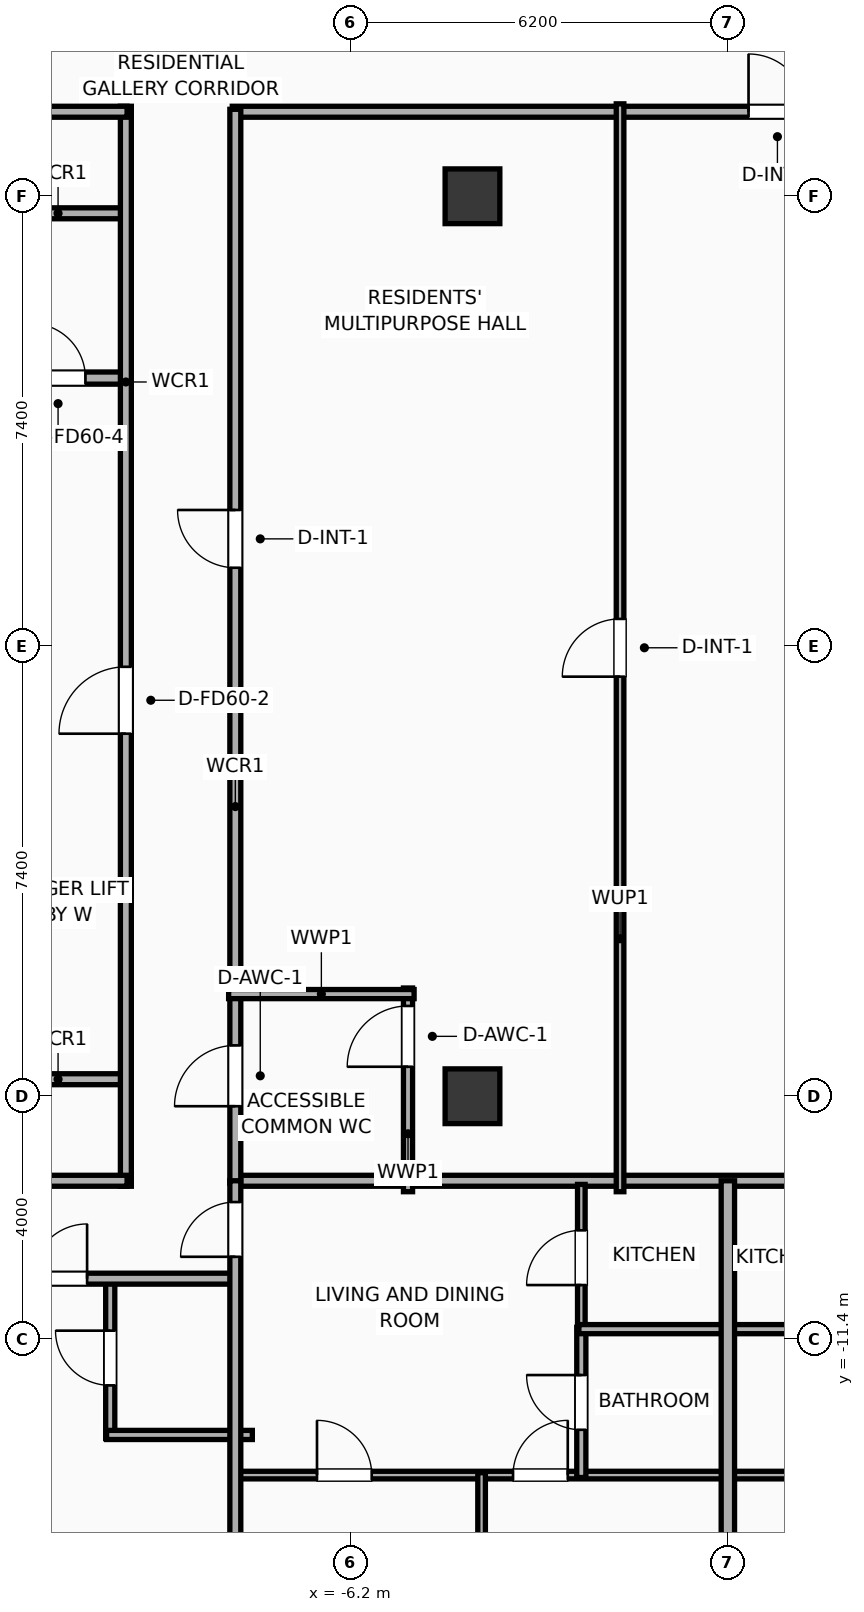
"""IFC4 building model, lengths in metres.
Left out: names, types, materials, properties, quantities, classifications, styles, units other than length and angle.
Written with IfcOpenShell. Run it as: python <this file> out.ifc"""

import sys

from ifc_helpers import new_model, si_unit, direction, frame, frame_2d, origin, origin_2d, place, context, subcontext, project, spatial, rectangle, extrude, element, fill, save


model = new_model("IFC4")
c1 = context("Model", 3, precision=1e-05, world=origin(), true_north=direction((0.0, 1.0)))
c2 = subcontext(c1, "Body", "Model", "MODEL_VIEW")
j1 = project(units=[si_unit("LENGTHUNIT", "METRE"), si_unit("PLANEANGLEUNIT", "RADIAN")], contexts=[c1])
p1 = place(None, origin())
s1 = spatial("IfcSite", under=j1, at=p1, CompositionType="ELEMENT")
p2 = place(p1, origin())
s2 = spatial("IfcBuilding", under=s1, at=p2, CompositionType="ELEMENT")
p3 = place(p2, frame((0.0, 0.0, 208.0)))
s3 = spatial("IfcBuildingStorey", under=s2, at=p3, CompositionType="ELEMENT", Elevation=208.0)
for number, where, z_axis, x_axis in (
    (1, (-4.2, -7.4, 0.0), (0.0, 0.0, 1.0), (1.0, 0.0, 0.0)),
    (2, (-4.2, 7.4, 0.0), (0.0, 0.0, 1.0), (1.0, 0.0, 0.0)),
):
    element("IfcColumn", number, at=place(p3, frame(where, z_axis=z_axis, x_axis=x_axis)), inside=s3, PredefinedType="COLUMN", context=c2, shape_type="SweptSolid", body=[
        extrude(rectangle(XDim=0.9, YDim=0.9, at=origin_2d()), origin(), (0.0, 0.0, 1.0), 3.9),
    ])
p4 = place(p3, frame((-12.15, 4.41, 0.0), z_axis=(0.0, 0.0, 1.0), x_axis=(1.0, 0.0, 0.0)))
e3 = element("IfcWall", 3, at=p4, inside=s3, PredefinedType="PARTITIONING", context=c2, shape_type="SweptSolid", body=[
    extrude(rectangle(XDim=2.27, YDim=0.2, at=frame_2d((1.135, 0.0))), origin(), (0.0, 0.0, 1.0), 3.65),
])
p5 = place(p4, frame((0.685, 0.0, 0.0)))
e4 = element("IfcOpeningElement", 4, at=p5, cuts=e3, PredefinedType="OPENING", context=c2, shape_type="SweptSolid", body=[
    extrude(rectangle(XDim=0.9, YDim=2.05, at=frame_2d((0.45, 1.025))), frame((0.0, 0.11, 0.0), z_axis=(0.0, -1.0, 0.0), x_axis=(1.0, 0.0, 0.0)), (0.0, 0.0, 1.0), 0.22),
])
for number, where, z_axis, x_axis in (
    (5, (-12.15, 7.12, 0.0), (0.0, 0.0, 1.0), (1.0, 0.0, 0.0)),
    (6, (-12.15, -7.12, 0.0), (0.0, 0.0, 1.0), (1.0, 0.0, 0.0)),
):
    element("IfcWall", number, at=place(p3, frame(where, z_axis=z_axis, x_axis=x_axis)), inside=s3, PredefinedType="PARTITIONING", context=c2, shape_type="SweptSolid", body=[
        extrude(rectangle(XDim=2.27, YDim=0.18, at=frame_2d((1.135, 0.0))), origin(), (0.0, 0.0, 1.0), 3.65),
    ])
p6 = place(p3, frame((-9.9, -8.88, 0.0), z_axis=(0.0, 0.0, 1.0), x_axis=(0.0, 1.0, 0.0)))
e7 = element("IfcWall", 7, at=p6, inside=s3, PredefinedType="PARTITIONING", context=c2, shape_type="SweptSolid", body=[
    extrude(rectangle(XDim=17.76, YDim=0.18, at=frame_2d((8.88, 0.0))), origin(), (0.0, 0.0, 1.0), 3.65),
])
p7 = place(p6, frame((7.442, 0.0, 0.0)))
e8 = element("IfcOpeningElement", 8, at=p7, cuts=e7, PredefinedType="OPENING", context=c2, shape_type="SweptSolid", body=[
    extrude(rectangle(XDim=1.1, YDim=2.05, at=frame_2d((0.55, 1.025))), frame((0.0, 0.1, 0.0), z_axis=(0.0, -1.0, 0.0), x_axis=(1.0, 0.0, 0.0)), (0.0, 0.0, 1.0), 0.2),
])
p8 = place(p3, frame((-26.23, 8.79, 0.0), z_axis=(0.0, 0.0, 1.0), x_axis=(1.0, 0.0, 0.0)))
e9 = element("IfcWall", 9, at=p8, inside=s3, PredefinedType="PARTITIONING", context=c2, shape_type="SweptSolid", body=[
    extrude(rectangle(XDim=16.35, YDim=0.18, at=frame_2d((8.175, 0.0))), origin(), (0.0, 0.0, 1.0), 3.65),
])
p9 = place(p8, frame((2.051, 0.0, 0.0)))
e10 = element("IfcOpeningElement", 10, at=p9, cuts=e9, PredefinedType="OPENING", context=c2, shape_type="SweptSolid", body=[
    extrude(rectangle(XDim=1.15, YDim=2.05, at=frame_2d((0.575, 1.025))), frame((0.0, 0.1, 0.0), z_axis=(0.0, -1.0, 0.0), x_axis=(1.0, 0.0, 0.0)), (0.0, 0.0, 1.0), 0.2),
])
p10 = place(p3, frame((-26.23, -8.79, 0.0), z_axis=(0.0, 0.0, 1.0), x_axis=(1.0, 0.0, 0.0)))
e11 = element("IfcWall", 11, at=p10, inside=s3, PredefinedType="PARTITIONING", context=c2, shape_type="SweptSolid", body=[
    extrude(rectangle(XDim=16.35, YDim=0.18, at=frame_2d((8.175, 0.0))), origin(), (0.0, 0.0, 1.0), 3.65),
])
p11 = place(p3, frame((-8.15, 8.79, 0.0), z_axis=(0.0, 0.0, 1.0), x_axis=(1.0, 0.0, 0.0)))
e12 = element("IfcWall", 12, at=p11, inside=s3, PredefinedType="PARTITIONING", context=c2, shape_type="SweptSolid", body=[
    extrude(rectangle(XDim=16.3, YDim=0.18, at=frame_2d((8.15, 0.0))), origin(), (0.0, 0.0, 1.0), 3.65),
])
p12 = place(p11, frame((8.49, 0.0, 0.0)))
e13 = element("IfcOpeningElement", 13, at=p12, cuts=e12, PredefinedType="OPENING", context=c2, shape_type="SweptSolid", body=[
    extrude(rectangle(XDim=0.95, YDim=2.05, at=frame_2d((0.475, 1.025))), frame((0.0, 0.1, 0.0), z_axis=(0.0, -1.0, 0.0), x_axis=(1.0, 0.0, 0.0)), (0.0, 0.0, 1.0), 0.2),
])
p13 = place(p3, frame((-8.15, -8.79, 0.0), z_axis=(0.0, 0.0, 1.0), x_axis=(1.0, 0.0, 0.0)))
e14 = element("IfcWall", 14, at=p13, inside=s3, PredefinedType="PARTITIONING", context=c2, shape_type="SweptSolid", body=[
    extrude(rectangle(XDim=16.3, YDim=0.18, at=frame_2d((8.15, 0.0))), origin(), (0.0, 0.0, 1.0), 3.65),
])
p14 = place(p3, frame((-8.1, -8.83, 0.0), z_axis=(0.0, 0.0, 1.0), x_axis=(0.0, 1.0, 0.0)))
e15 = element("IfcWall", 15, at=p14, inside=s3, PredefinedType="PARTITIONING", context=c2, shape_type="SweptSolid", body=[
    extrude(rectangle(XDim=17.66, YDim=0.18, at=frame_2d((8.83, 0.0))), origin(), (0.0, 0.0, 1.0), 3.65),
])
p15 = place(p14, frame((1.266, 0.0, 0.0)))
e16 = element("IfcOpeningElement", 16, at=p15, cuts=e15, PredefinedType="OPENING", context=c2, shape_type="SweptSolid", body=[
    extrude(rectangle(XDim=1.0, YDim=2.05, at=frame_2d((0.5, 1.025))), frame((0.0, 0.1, 0.0), z_axis=(0.0, -1.0, 0.0), x_axis=(1.0, 0.0, 0.0)), (0.0, 0.0, 1.0), 0.2),
])
p16 = place(p14, frame((10.121, 0.0, 0.0)))
e17 = element("IfcOpeningElement", 17, at=p16, cuts=e15, PredefinedType="OPENING", context=c2, shape_type="SweptSolid", body=[
    extrude(rectangle(XDim=0.95, YDim=2.05, at=frame_2d((0.475, 1.025))), frame((0.0, 0.1, 0.0), z_axis=(0.0, -1.0, 0.0), x_axis=(1.0, 0.0, 0.0)), (0.0, 0.0, 1.0), 0.2),
])
p17 = place(p3, frame((-5.26, -8.97, 0.0), z_axis=(0.0, 0.0, 1.0), x_axis=(0.0, 1.0, 0.0)))
e18 = element("IfcWall", 18, at=p17, inside=s3, PredefinedType="PLUMBINGWALL", context=c2, shape_type="SweptSolid", body=[
    extrude(rectangle(XDim=3.35, YDim=0.15, at=frame_2d((1.675, 0.0))), origin(), (0.0, 0.0, 1.0), 3.65),
])
p18 = place(p17, frame((2.055, 0.0, 0.0)))
e19 = element("IfcOpeningElement", 19, at=p18, cuts=e18, PredefinedType="OPENING", context=c2, shape_type="SweptSolid", body=[
    extrude(rectangle(XDim=1.0, YDim=2.05, at=frame_2d((0.5, 1.025))), frame((0.0, 0.085, 0.0), z_axis=(0.0, -1.0, 0.0), x_axis=(1.0, 0.0, 0.0)), (0.0, 0.0, 1.0), 0.17),
])
p19 = place(p3, frame((-8.21, -5.72, 0.0), z_axis=(0.0, 0.0, 1.0), x_axis=(1.0, 0.0, 0.0)))
e20 = element("IfcWall", 20, at=p19, inside=s3, PredefinedType="PLUMBINGWALL", context=c2, shape_type="SweptSolid", body=[
    extrude(rectangle(XDim=3.05, YDim=0.15, at=frame_2d((1.525, 0.0))), origin(), (0.0, 0.0, 1.0), 3.65),
])
p20 = place(p3, frame((-1.773, -8.97, 0.0), z_axis=(0.0, 0.0, 1.0), x_axis=(0.0, 1.0, 0.0)))
e21 = element("IfcWall", 21, at=p20, inside=s3, PredefinedType="PARTITIONING", context=c2, shape_type="SweptSolid", body=[
    extrude(rectangle(XDim=17.89, YDim=0.125, at=frame_2d((8.945, 0.0))), origin(), (0.0, 0.0, 1.0), 3.65),
])
p21 = place(p20, frame((8.47, 0.0, 0.0)))
e22 = element("IfcOpeningElement", 22, at=p21, cuts=e21, PredefinedType="OPENING", context=c2, shape_type="SweptSolid", body=[
    extrude(rectangle(XDim=0.95, YDim=2.05, at=frame_2d((0.475, 1.025))), frame((0.0, 0.073, 0.0), z_axis=(0.0, -1.0, 0.0), x_axis=(1.0, 0.0, 0.0)), (0.0, 0.0, 1.0), 0.145),
])
p22 = place(p3, frame((-10.157, -13.03, 0.0), z_axis=(0.0, 0.0, 1.0), x_axis=(0.0, 1.0, 0.0)))
e23 = element("IfcWall", 23, at=p22, inside=s3, PredefinedType="PLUMBINGWALL", context=c2, shape_type="SweptSolid", body=[
    extrude(rectangle(XDim=2.65, YDim=0.15, at=frame_2d((1.325, 0.0))), origin(), (0.0, 0.0, 1.0), 3.65),
])
p23 = place(p22, frame((0.875, 0.0, 0.0)))
e24 = element("IfcOpeningElement", 24, at=p23, cuts=e23, PredefinedType="OPENING", context=c2, shape_type="SweptSolid", body=[
    extrude(rectangle(XDim=0.9, YDim=2.05, at=frame_2d((0.45, 1.025))), frame((0.0, 0.085, 0.0), z_axis=(0.0, -1.0, 0.0), x_axis=(1.0, 0.0, 0.0)), (0.0, 0.0, 1.0), 0.17),
])
p24 = place(p3, frame((-10.217, -12.97, 0.0), z_axis=(0.0, 0.0, 1.0), x_axis=(1.0, 0.0, 0.0)))
e25 = element("IfcWall", 25, at=p24, inside=s3, PredefinedType="PLUMBINGWALL", context=c2, shape_type="SweptSolid", body=[
    extrude(rectangle(XDim=2.397, YDim=0.15, at=frame_2d((1.198, 0.0))), origin(), (0.0, 0.0, 1.0), 3.65),
])
p25 = place(p3, frame((-26.23, -10.4, 0.0), z_axis=(0.0, 0.0, 1.0), x_axis=(1.0, 0.0, 0.0)))
e26 = element("IfcWall", 26, at=p25, inside=s3, PredefinedType="PARTITIONING", context=c2, shape_type="SweptSolid", body=[
    extrude(rectangle(XDim=18.15, YDim=0.18, at=frame_2d((9.075, 0.0))), origin(), (0.0, 0.0, 1.0), 3.65),
])
p26 = place(p25, frame((2.414, 0.0, 0.0)))
e27 = element("IfcOpeningElement", 27, at=p26, cuts=e26, PredefinedType="OPENING", context=c2, shape_type="SweptSolid", body=[
    extrude(rectangle(XDim=1.15, YDim=2.05, at=frame_2d((0.575, 1.025))), frame((0.0, 0.1, 0.0), z_axis=(0.0, -1.0, 0.0), x_axis=(1.0, 0.0, 0.0)), (0.0, 0.0, 1.0), 0.2),
])
p27 = place(p25, frame((9.703, 0.0, 0.0)))
e28 = element("IfcOpeningElement", 28, at=p27, cuts=e26, PredefinedType="OPENING", context=c2, shape_type="SweptSolid", body=[
    extrude(rectangle(XDim=1.15, YDim=2.05, at=frame_2d((0.575, 1.025))), frame((0.0, 0.1, 0.0), z_axis=(0.0, -1.0, 0.0), x_axis=(1.0, 0.0, 0.0)), (0.0, 0.0, 1.0), 0.2),
])
p28 = place(p25, frame((14.792, 0.0, 0.0)))
e29 = element("IfcOpeningElement", 29, at=p28, cuts=e26, PredefinedType="OPENING", context=c2, shape_type="SweptSolid", body=[
    extrude(rectangle(XDim=0.9, YDim=2.05, at=frame_2d((0.45, 1.025))), frame((0.0, 0.1, 0.0), z_axis=(0.0, -1.0, 0.0), x_axis=(1.0, 0.0, 0.0)), (0.0, 0.0, 1.0), 0.2),
])
p29 = place(p3, frame((-8.08, -13.63, 0.0), z_axis=(0.0, 0.0, 1.0), x_axis=(1.0, 0.0, 0.0)))
e30 = element("IfcWall", 30, at=p29, inside=s3, PredefinedType="PARTITIONING", context=c2, shape_type="SweptSolid", body=[
    extrude(rectangle(XDim=8.06, YDim=0.125, at=frame_2d((4.03, 0.0))), origin(), (0.0, 0.0, 1.0), 3.65),
])
p30 = place(p29, frame((1.323, 0.0, 0.0)))
e31 = element("IfcOpeningElement", 31, at=p30, cuts=e30, PredefinedType="OPENING", context=c2, shape_type="SweptSolid", body=[
    extrude(rectangle(XDim=0.9, YDim=2.05, at=frame_2d((0.45, 1.025))), frame((0.0, 0.073, 0.0), z_axis=(0.0, -1.0, 0.0), x_axis=(1.0, 0.0, 0.0)), (0.0, 0.0, 1.0), 0.145),
])
p31 = place(p29, frame((4.547, 0.0, 0.0)))
e32 = element("IfcOpeningElement", 32, at=p31, cuts=e30, PredefinedType="OPENING", context=c2, shape_type="SweptSolid", body=[
    extrude(rectangle(XDim=0.9, YDim=2.05, at=frame_2d((0.45, 1.025))), frame((0.0, 0.073, 0.0), z_axis=(0.0, -1.0, 0.0), x_axis=(1.0, 0.0, 0.0)), (0.0, 0.0, 1.0), 0.145),
])
p32 = place(p3, frame((-2.41, -11.26, 0.0), z_axis=(0.0, 0.0, 1.0), x_axis=(0.0, 1.0, 0.0)))
e33 = element("IfcWall", 33, at=p32, inside=s3, PredefinedType="PARTITIONING", context=c2, shape_type="SweptSolid", body=[
    extrude(rectangle(XDim=2.41, YDim=0.125, at=frame_2d((1.205, 0.0))), origin(), (0.0, 0.0, 1.0), 3.65),
])
p33 = place(p32, frame((0.755, 0.0, 0.0)))
e34 = element("IfcOpeningElement", 34, at=p33, cuts=e33, PredefinedType="OPENING", context=c2, shape_type="SweptSolid", body=[
    extrude(rectangle(XDim=0.9, YDim=2.05, at=frame_2d((0.45, 1.025))), frame((0.0, 0.073, 0.0), z_axis=(0.0, -1.0, 0.0), x_axis=(1.0, 0.0, 0.0)), (0.0, 0.0, 1.0), 0.145),
])
p34 = place(p3, frame((-2.41, -13.67, 0.0), z_axis=(0.0, 0.0, 1.0), x_axis=(0.0, 1.0, 0.0)))
e35 = element("IfcWall", 35, at=p34, inside=s3, PredefinedType="PLUMBINGWALL", context=c2, shape_type="SweptSolid", body=[
    extrude(rectangle(XDim=2.47, YDim=0.15, at=frame_2d((1.235, 0.0))), origin(), (0.0, 0.0, 1.0), 3.65),
])
p35 = place(p34, frame((0.785, 0.0, 0.0)))
e36 = element("IfcOpeningElement", 36, at=p35, cuts=e35, PredefinedType="OPENING", context=c2, shape_type="SweptSolid", body=[
    extrude(rectangle(XDim=0.9, YDim=2.05, at=frame_2d((0.45, 1.025))), frame((0.0, 0.085, 0.0), z_axis=(0.0, -1.0, 0.0), x_axis=(1.0, 0.0, 0.0)), (0.0, 0.0, 1.0), 0.17),
])
p36 = place(p3, frame((-2.45, -11.23, 0.0), z_axis=(0.0, 0.0, 1.0), x_axis=(1.0, 0.0, 0.0)))
e37 = element("IfcWall", 37, at=p36, inside=s3, PredefinedType="PLUMBINGWALL", context=c2, shape_type="SweptSolid", body=[
    extrude(rectangle(XDim=2.43, YDim=0.15, at=frame_2d((1.215, 0.0))), origin(), (0.0, 0.0, 1.0), 3.65),
])
p37 = place(p3, frame((-4.05, -18.83, 0.0), z_axis=(0.0, 0.0, 1.0), x_axis=(0.0, 1.0, 0.0)))
e38 = element("IfcWall", 38, at=p37, inside=s3, PredefinedType="PARTITIONING", context=c2, shape_type="SweptSolid", body=[
    extrude(rectangle(XDim=5.24, YDim=0.125, at=frame_2d((2.62, 0.0))), origin(), (0.0, 0.0, 1.0), 3.65),
])
p38 = place(p3, frame((-8.1, -18.83, 0.0), z_axis=(0.0, 0.0, 1.0), x_axis=(0.0, 1.0, 0.0)))
e39 = element("IfcWall", 39, at=p38, inside=s3, PredefinedType="PARTITIONING", context=c2, shape_type="SweptSolid", body=[
    extrude(rectangle(XDim=10.04, YDim=0.18, at=frame_2d((5.02, 0.0))), origin(), (0.0, 0.0, 1.0), 3.65),
])
p39 = place(p38, frame((8.79, 0.0, 0.0)))
e40 = element("IfcOpeningElement", 40, at=p39, cuts=e39, PredefinedType="OPENING", context=c2, shape_type="SweptSolid", body=[
    extrude(rectangle(XDim=0.9, YDim=2.05, at=frame_2d((0.45, 1.025))), frame((0.0, 0.1, 0.0), z_axis=(0.0, -1.0, 0.0), x_axis=(1.0, 0.0, 0.0)), (0.0, 0.0, 1.0), 0.2),
])
p40 = place(p3, frame((0.02, -13.63, 0.0), z_axis=(0.0, 0.0, 1.0), x_axis=(1.0, 0.0, 0.0)))
e41 = element("IfcWall", 41, at=p40, inside=s3, PredefinedType="PARTITIONING", context=c2, shape_type="SweptSolid", body=[
    extrude(rectangle(XDim=8.06, YDim=0.125, at=frame_2d((4.03, 0.0))), origin(), (0.0, 0.0, 1.0), 3.65),
])
p41 = place(p40, frame((1.323, 0.0, 0.0)))
e42 = element("IfcOpeningElement", 42, at=p41, cuts=e41, PredefinedType="OPENING", context=c2, shape_type="SweptSolid", body=[
    extrude(rectangle(XDim=0.9, YDim=2.05, at=frame_2d((0.45, 1.025))), frame((0.0, 0.073, 0.0), z_axis=(0.0, -1.0, 0.0), x_axis=(1.0, 0.0, 0.0)), (0.0, 0.0, 1.0), 0.145),
])
p42 = place(p40, frame((5.837, 0.0, 0.0)))
e43 = element("IfcOpeningElement", 43, at=p42, cuts=e41, PredefinedType="OPENING", context=c2, shape_type="SweptSolid", body=[
    extrude(rectangle(XDim=0.9, YDim=2.05, at=frame_2d((0.45, 1.025))), frame((0.0, 0.073, 0.0), z_axis=(0.0, -1.0, 0.0), x_axis=(1.0, 0.0, 0.0)), (0.0, 0.0, 1.0), 0.145),
])
p43 = place(p3, frame((0.02, -11.23, 0.0), z_axis=(0.0, 0.0, 1.0), x_axis=(1.0, 0.0, 0.0)))
e44 = element("IfcWall", 44, at=p43, inside=s3, PredefinedType="PLUMBINGWALL", context=c2, shape_type="SweptSolid", body=[
    extrude(rectangle(XDim=2.43, YDim=0.15, at=frame_2d((1.215, 0.0))), origin(), (0.0, 0.0, 1.0), 3.65),
])
p44 = place(p3, frame((0.0, -18.83, 0.0), z_axis=(0.0, 0.0, 1.0), x_axis=(0.0, 1.0, 0.0)))
e45 = element("IfcWall", 45, at=p44, inside=s3, PredefinedType="PARTITIONING", context=c2, shape_type="SweptSolid", body=[
    extrude(rectangle(XDim=10.04, YDim=0.22, at=frame_2d((5.02, 0.0))), origin(), (0.0, 0.0, 1.0), 3.65),
])
p45 = place(p5, origin())
e46 = element("IfcDoor", 46, at=p45, inside=s3, OperationType="SINGLE_SWING_LEFT", PredefinedType="DOOR", context=c2, shape_type="SweptSolid", body=[
    extrude(rectangle(XDim=0.9, YDim=2.05, at=frame_2d((0.45, 1.025))), frame((0.0, 0.025, 0.0), z_axis=(0.0, -1.0, 0.0), x_axis=(1.0, 0.0, 0.0)), (0.0, 0.0, 1.0), 0.05),
])
fill(e4, e46)
p46 = place(p7, origin())
e47 = element("IfcDoor", 47, at=p46, inside=s3, OperationType="SINGLE_SWING_LEFT", PredefinedType="DOOR", context=c2, shape_type="SweptSolid", body=[
    extrude(rectangle(XDim=1.1, YDim=2.05, at=frame_2d((0.55, 1.025))), frame((0.0, 0.025, 0.0), z_axis=(0.0, -1.0, 0.0), x_axis=(1.0, 0.0, 0.0)), (0.0, 0.0, 1.0), 0.05),
])
fill(e8, e47)
p47 = place(p12, origin())
e48 = element("IfcDoor", 48, at=p47, inside=s3, OperationType="SINGLE_SWING_LEFT", PredefinedType="DOOR", context=c2, shape_type="SweptSolid", body=[
    extrude(rectangle(XDim=0.95, YDim=2.05, at=frame_2d((0.475, 1.025))), frame((0.0, 0.025, 0.0), z_axis=(0.0, -1.0, 0.0), x_axis=(1.0, 0.0, 0.0)), (0.0, 0.0, 1.0), 0.05),
])
fill(e13, e48)
p48 = place(p15, origin())
e49 = element("IfcDoor", 49, at=p48, inside=s3, OperationType="SINGLE_SWING_LEFT", PredefinedType="DOOR", context=c2, shape_type="SweptSolid", body=[
    extrude(rectangle(XDim=1.0, YDim=2.05, at=frame_2d((0.5, 1.025))), frame((0.0, 0.025, 0.0), z_axis=(0.0, -1.0, 0.0), x_axis=(1.0, 0.0, 0.0)), (0.0, 0.0, 1.0), 0.05),
])
fill(e16, e49)
p49 = place(p16, origin())
e50 = element("IfcDoor", 50, at=p49, inside=s3, OperationType="SINGLE_SWING_RIGHT", PredefinedType="DOOR", context=c2, shape_type="SweptSolid", body=[
    extrude(rectangle(XDim=0.95, YDim=2.05, at=frame_2d((0.475, 1.025))), frame((0.0, 0.025, 0.0), z_axis=(0.0, -1.0, 0.0), x_axis=(1.0, 0.0, 0.0)), (0.0, 0.0, 1.0), 0.05),
])
fill(e17, e50)
p50 = place(p18, origin())
e51 = element("IfcDoor", 51, at=p50, inside=s3, OperationType="SINGLE_SWING_LEFT", PredefinedType="DOOR", context=c2, shape_type="SweptSolid", body=[
    extrude(rectangle(XDim=1.0, YDim=2.05, at=frame_2d((0.5, 1.025))), frame((0.0, 0.025, 0.0), z_axis=(0.0, -1.0, 0.0), x_axis=(1.0, 0.0, 0.0)), (0.0, 0.0, 1.0), 0.05),
])
fill(e19, e51)
p51 = place(p21, origin())
e52 = element("IfcDoor", 52, at=p51, inside=s3, OperationType="SINGLE_SWING_LEFT", PredefinedType="DOOR", context=c2, shape_type="SweptSolid", body=[
    extrude(rectangle(XDim=0.95, YDim=2.05, at=frame_2d((0.475, 1.025))), frame((0.0, 0.025, 0.0), z_axis=(0.0, -1.0, 0.0), x_axis=(1.0, 0.0, 0.0)), (0.0, 0.0, 1.0), 0.05),
])
fill(e22, e52)
p52 = place(p23, origin())
e53 = element("IfcDoor", 53, at=p52, inside=s3, OperationType="SINGLE_SWING_RIGHT", PredefinedType="DOOR", context=c2, shape_type="SweptSolid", body=[
    extrude(rectangle(XDim=0.9, YDim=2.05, at=frame_2d((0.45, 1.025))), frame((0.0, 0.025, 0.0), z_axis=(0.0, -1.0, 0.0), x_axis=(1.0, 0.0, 0.0)), (0.0, 0.0, 1.0), 0.05),
])
fill(e24, e53)
p53 = place(p28, origin())
e54 = element("IfcDoor", 54, at=p53, inside=s3, OperationType="SINGLE_SWING_RIGHT", PredefinedType="DOOR", context=c2, shape_type="SweptSolid", body=[
    extrude(rectangle(XDim=0.9, YDim=2.05, at=frame_2d((0.45, 1.025))), frame((0.0, 0.025, 0.0), z_axis=(0.0, -1.0, 0.0), x_axis=(1.0, 0.0, 0.0)), (0.0, 0.0, 1.0), 0.05),
])
fill(e29, e54)
p54 = place(p30, origin())
e55 = element("IfcDoor", 55, at=p54, inside=s3, OperationType="SINGLE_SWING_LEFT", PredefinedType="DOOR", context=c2, shape_type="SweptSolid", body=[
    extrude(rectangle(XDim=0.9, YDim=2.05, at=frame_2d((0.45, 1.025))), frame((0.0, 0.025, 0.0), z_axis=(0.0, -1.0, 0.0), x_axis=(1.0, 0.0, 0.0)), (0.0, 0.0, 1.0), 0.05),
])
fill(e31, e55)
p55 = place(p31, origin())
e56 = element("IfcDoor", 56, at=p55, inside=s3, OperationType="SINGLE_SWING_RIGHT", PredefinedType="DOOR", context=c2, shape_type="SweptSolid", body=[
    extrude(rectangle(XDim=0.9, YDim=2.05, at=frame_2d((0.45, 1.025))), frame((0.0, 0.025, 0.0), z_axis=(0.0, -1.0, 0.0), x_axis=(1.0, 0.0, 0.0)), (0.0, 0.0, 1.0), 0.05),
])
fill(e32, e56)
p56 = place(p33, origin())
e57 = element("IfcDoor", 57, at=p56, inside=s3, OperationType="SINGLE_SWING_LEFT", PredefinedType="DOOR", context=c2, shape_type="SweptSolid", body=[
    extrude(rectangle(XDim=0.9, YDim=2.05, at=frame_2d((0.45, 1.025))), frame((0.0, 0.025, 0.0), z_axis=(0.0, -1.0, 0.0), x_axis=(1.0, 0.0, 0.0)), (0.0, 0.0, 1.0), 0.05),
])
fill(e34, e57)
p57 = place(p35, origin())
e58 = element("IfcDoor", 58, at=p57, inside=s3, OperationType="SINGLE_SWING_RIGHT", PredefinedType="DOOR", context=c2, shape_type="SweptSolid", body=[
    extrude(rectangle(XDim=0.9, YDim=2.05, at=frame_2d((0.45, 1.025))), frame((0.0, 0.025, 0.0), z_axis=(0.0, -1.0, 0.0), x_axis=(1.0, 0.0, 0.0)), (0.0, 0.0, 1.0), 0.05),
])
fill(e36, e58)
p58 = place(p39, origin())
e59 = element("IfcDoor", 59, at=p58, inside=s3, OperationType="SINGLE_SWING_LEFT", PredefinedType="DOOR", context=c2, shape_type="SweptSolid", body=[
    extrude(rectangle(XDim=0.9, YDim=2.05, at=frame_2d((0.45, 1.025))), frame((0.0, 0.025, 0.0), z_axis=(0.0, -1.0, 0.0), x_axis=(1.0, 0.0, 0.0)), (0.0, 0.0, 1.0), 0.05),
])
fill(e40, e59)
save(model, sys.argv[1])
